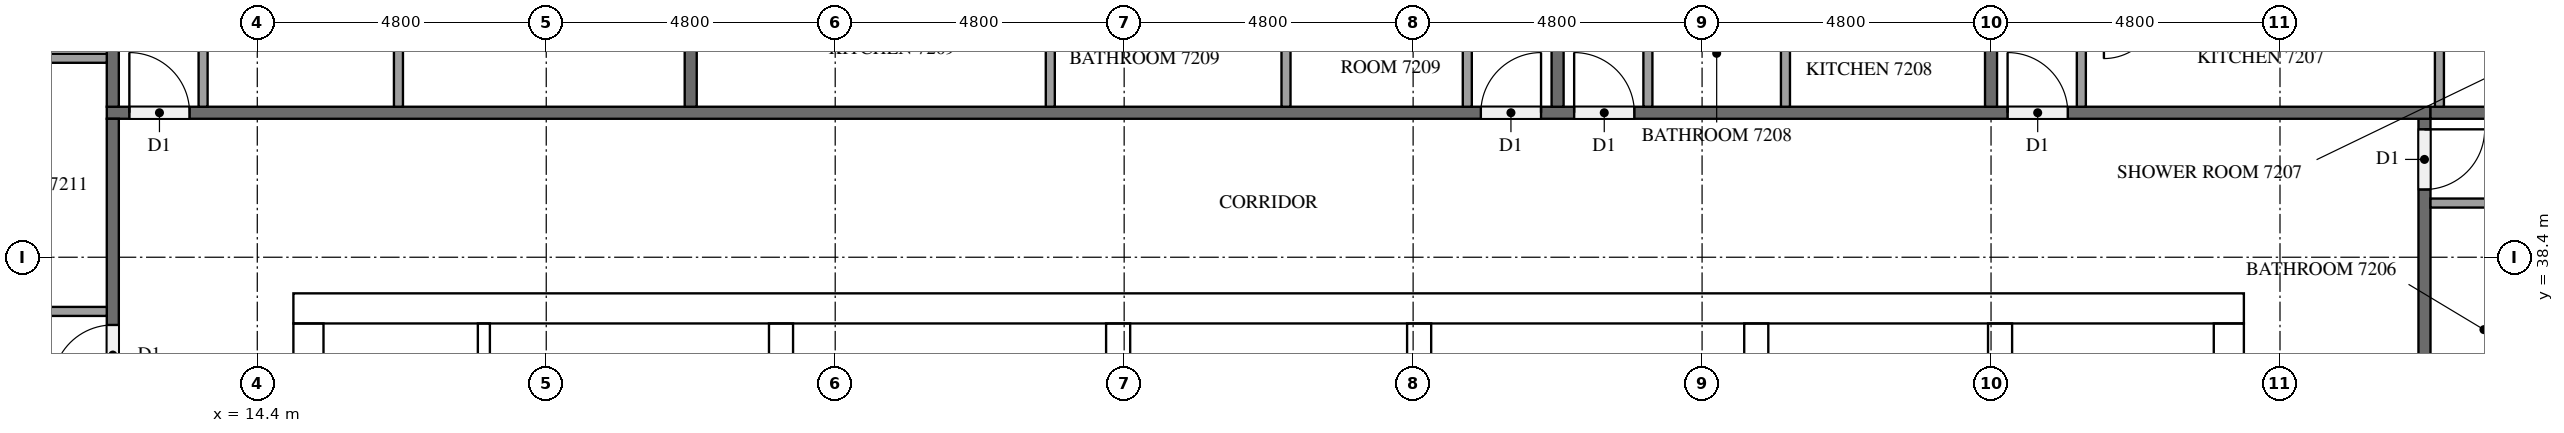
"""IFC4 building model, lengths in metres.
Left out: names, types, materials, properties, quantities, classifications, styles, units other than length and angle.
Written with IfcOpenShell. Run it as: python <this file> out.ifc"""

import sys

from ifc_helpers import new_model, si_unit, direction, frame, frame_2d, origin, place, context, subcontext, project, spatial, rectangle, extrude, element, fill, save


model = new_model("IFC4")
c1 = context("Model", 3, precision=1e-05, world=origin(), true_north=direction((0.0, 1.0)))
c2 = subcontext(c1, "Body", "Model", "MODEL_VIEW")
j1 = project(units=[si_unit("LENGTHUNIT", "METRE"), si_unit("PLANEANGLEUNIT", "RADIAN")], contexts=[c1])
p1 = place(None, origin())
s1 = spatial("IfcSite", under=j1, at=p1, CompositionType="ELEMENT")
p2 = place(p1, origin())
s2 = spatial("IfcBuilding", under=s1, at=p2, CompositionType="ELEMENT")
p3 = place(p2, frame((0.0, 0.0, 275.6)))
s3 = spatial("IfcBuildingStorey", under=s2, at=p3, CompositionType="ELEMENT", Elevation=275.6)
p4 = place(p3, frame((15.0, 37.55, 0.0), z_axis=(0.0, 0.0, 1.0), x_axis=(1.0, 0.0, 0.0)))
e1 = element("IfcWall", 1, at=p4, inside=s3, PredefinedType="SHEAR", context=c2, shape_type="SweptSolid", body=[
    extrude(rectangle(XDim=32.4, YDim=0.5, at=frame_2d((16.2, 0.0))), origin(), (0.0, 0.0, 1.0), 3.2),
])
p5 = place(p4, frame((15.3, 0.0, 0.0)))
e2 = element("IfcOpeningElement", 2, at=p5, cuts=e1, PredefinedType="OPENING", context=c2, shape_type="SweptSolid", body=[
    extrude(rectangle(XDim=1.8, YDim=2.1, at=frame_2d((0.9, 1.05))), frame((0.0, 0.26, 0.0), z_axis=(0.0, -1.0, 0.0), x_axis=(1.0, 0.0, 0.0)), (0.0, 0.0, 1.0), 0.52),
])
p6 = place(p4, frame((1.282, 0.0, 0.0)))
e3 = element("IfcOpeningElement", 3, at=p6, cuts=e1, PredefinedType="OPENING", context=c2, shape_type="SweptSolid", body=[
    extrude(rectangle(XDim=1.0, YDim=2.1, at=frame_2d((0.5, 1.05))), frame((0.0, 0.26, 0.0), z_axis=(0.0, -1.0, 0.0), x_axis=(1.0, 0.0, 0.0)), (0.0, 0.0, 1.0), 0.52),
])
p7 = place(p4, frame((5.082, 0.0, 0.0)))
e4 = element("IfcOpeningElement", 4, at=p7, cuts=e1, PredefinedType="OPENING", context=c2, shape_type="SweptSolid", body=[
    extrude(rectangle(XDim=1.0, YDim=2.1, at=frame_2d((0.5, 1.05))), frame((0.0, 0.26, 0.0), z_axis=(0.0, -1.0, 0.0), x_axis=(1.0, 0.0, 0.0)), (0.0, 0.0, 1.0), 0.52),
])
p8 = place(p3, frame((15.25, 15.5, 0.0), z_axis=(0.0, 0.0, 1.0), x_axis=(0.0, 1.0, 0.0)))
e5 = element("IfcWall", 5, at=p8, inside=s3, PredefinedType="SHEAR", context=c2, shape_type="SweptSolid", body=[
    extrude(rectangle(XDim=21.8, YDim=0.5, at=frame_2d((10.9, 0.0))), origin(), (0.0, 0.0, 1.0), 3.2),
])
p9 = place(p8, frame((5.26, 0.0, 0.0)))
e6 = element("IfcOpeningElement", 6, at=p9, cuts=e5, PredefinedType="OPENING", context=c2, shape_type="SweptSolid", body=[
    extrude(rectangle(XDim=1.2, YDim=2.1, at=frame_2d((0.6, 1.05))), frame((0.0, 0.26, 0.0), z_axis=(0.0, -1.0, 0.0), x_axis=(1.0, 0.0, 0.0)), (0.0, 0.0, 1.0), 0.52),
])
p10 = place(p3, frame((47.15, 15.5, 0.0), z_axis=(0.0, 0.0, 1.0), x_axis=(0.0, 1.0, 0.0)))
e7 = element("IfcWall", 7, at=p10, inside=s3, PredefinedType="SHEAR", context=c2, shape_type="SweptSolid", body=[
    extrude(rectangle(XDim=21.8, YDim=0.5, at=frame_2d((10.9, 0.0))), origin(), (0.0, 0.0, 1.0), 3.2),
])
p11 = place(p10, frame((10.6, 0.0, 0.0)))
e8 = element("IfcOpeningElement", 8, at=p11, cuts=e7, PredefinedType="OPENING", context=c2, shape_type="SweptSolid", body=[
    extrude(rectangle(XDim=1.2, YDim=2.1, at=frame_2d((0.6, 1.05))), frame((0.0, 0.26, 0.0), z_axis=(0.0, -1.0, 0.0), x_axis=(1.0, 0.0, 0.0)), (0.0, 0.0, 1.0), 0.52),
])
p12 = place(p3, frame((23.1, 15.5, 0.0), z_axis=(0.0, 0.0, 1.0), x_axis=(0.0, 1.0, 0.0)))
e9 = element("IfcWall", 9, at=p12, inside=s3, PredefinedType="SHEAR", context=c2, shape_type="SweptSolid", body=[
    extrude(rectangle(XDim=21.8, YDim=0.4, at=frame_2d((10.9, 0.0))), origin(), (0.0, 0.0, 1.0), 3.2),
])
p13 = place(p3, frame((39.3, 27.75, 0.0), z_axis=(0.0, 0.0, 1.0), x_axis=(0.0, 1.0, 0.0)))
e10 = element("IfcWall", 10, at=p13, inside=s3, PredefinedType="SHEAR", context=c2, shape_type="SweptSolid", body=[
    extrude(rectangle(XDim=9.55, YDim=0.4, at=frame_2d((4.775, 0.0))), origin(), (0.0, 0.0, 1.0), 3.2),
])
p14 = place(p3, frame((43.35, 27.75, 0.0), z_axis=(0.0, 0.0, 1.0), x_axis=(0.0, 1.0, 0.0)))
e11 = element("IfcWall", 11, at=p14, inside=s3, PredefinedType="SHEAR", context=c2, shape_type="SweptSolid", body=[
    extrude(rectangle(XDim=9.55, YDim=0.4, at=frame_2d((4.775, 0.0))), origin(), (0.0, 0.0, 1.0), 3.2),
])
p15 = place(p14, frame((7.65, 0.0, 0.0)))
e12 = element("IfcOpeningElement", 12, at=p15, cuts=e11, PredefinedType="OPENING", context=c2, shape_type="SweptSolid", body=[
    extrude(rectangle(XDim=1.2, YDim=2.1, at=frame_2d((0.6, 1.05))), frame((0.0, 0.21, 0.0), z_axis=(0.0, -1.0, 0.0), x_axis=(1.0, 0.0, 0.0)), (0.0, 0.0, 1.0), 0.42),
])
for number, where, z_axis, x_axis in (
    (13, (28.7, 33.75, 0.0), (0.0, 0.0, 1.0), (0.0, 1.0, 0.0)),
    (14, (33.7, 33.75, 0.0), (0.0, 0.0, 1.0), (0.0, 1.0, 0.0)),
):
    element("IfcWall", number, at=place(p3, frame(where, z_axis=z_axis, x_axis=x_axis)), inside=s3, PredefinedType="SHEAR", context=c2, shape_type="SweptSolid", body=[
        extrude(rectangle(XDim=3.55, YDim=0.4, at=frame_2d((1.775, 0.0))), origin(), (0.0, 0.0, 1.0), 3.2),
    ])
p16 = place(p3, frame((18.164, 31.45, 0.0), z_axis=(0.0, 0.0, 1.0), x_axis=(0.0, 1.0, 0.0)))
e15 = element("IfcWall", 15, at=p16, inside=s3, PredefinedType="PARTITIONING", context=c2, shape_type="SweptSolid", body=[
    extrude(rectangle(XDim=5.85, YDim=0.2, at=frame_2d((2.925, 0.0))), origin(), (0.0, 0.0, 1.0), 3.2),
])
p17 = place(p3, frame((50.4, 40.7, 0.0), z_axis=(0.0, 0.0, 1.0), x_axis=(0.0, -1.0, 0.0)))
e16 = element("IfcWall", 16, at=p17, inside=s3, PredefinedType="PARTITIONING", context=c2, shape_type="SweptSolid", body=[
    extrude(rectangle(XDim=28.6, YDim=0.2, at=frame_2d((14.3, 0.0))), origin(), (0.0, 0.0, 1.0), 3.2),
])
p18 = place(p17, frame((27.425, 0.0, 0.0)))
e17 = element("IfcOpeningElement", 17, at=p18, cuts=e16, PredefinedType="OPENING", context=c2, shape_type="SweptSolid", body=[
    extrude(rectangle(XDim=1.0, YDim=2.1, at=frame_2d((0.5, 1.05))), frame((0.0, 0.11, 0.0), z_axis=(0.0, -1.0, 0.0), x_axis=(1.0, 0.0, 0.0)), (0.0, 0.0, 1.0), 0.22),
])
p19 = place(p17, frame((0.175, 0.0, 0.0)))
e18 = element("IfcOpeningElement", 18, at=p19, cuts=e16, PredefinedType="OPENING", context=c2, shape_type="SweptSolid", body=[
    extrude(rectangle(XDim=1.0, YDim=2.1, at=frame_2d((0.5, 1.05))), frame((0.0, 0.11, 0.0), z_axis=(0.0, -1.0, 0.0), x_axis=(1.0, 0.0, 0.0)), (0.0, 0.0, 1.0), 0.22),
])
p20 = place(p3, frame((11.9, 40.8, 0.0), z_axis=(0.0, 0.0, 1.0), x_axis=(1.0, 0.0, 0.0)))
e19 = element("IfcWall", 19, at=p20, inside=s3, PredefinedType="PARTITIONING", context=c2, shape_type="SweptSolid", body=[
    extrude(rectangle(XDim=38.6, YDim=0.2, at=frame_2d((19.3, 0.0))), origin(), (0.0, 0.0, 1.0), 3.2),
])
p21 = place(p20, frame((31.575, 0.0, 0.0)))
e20 = element("IfcOpeningElement", 20, at=p21, cuts=e19, PredefinedType="OPENING", context=c2, shape_type="SweptSolid", body=[
    extrude(rectangle(XDim=1.0, YDim=2.1, at=frame_2d((0.5, 1.05))), frame((0.0, 0.11, 0.0), z_axis=(0.0, -1.0, 0.0), x_axis=(1.0, 0.0, 0.0)), (0.0, 0.0, 1.0), 0.22),
])
p22 = place(p20, frame((24.375, 0.0, 0.0)))
e21 = element("IfcOpeningElement", 21, at=p22, cuts=e19, PredefinedType="OPENING", context=c2, shape_type="SweptSolid", body=[
    extrude(rectangle(XDim=1.0, YDim=2.1, at=frame_2d((0.5, 1.05))), frame((0.0, 0.11, 0.0), z_axis=(0.0, -1.0, 0.0), x_axis=(1.0, 0.0, 0.0)), (0.0, 0.0, 1.0), 0.22),
])
p23 = place(p20, frame((22.825, 0.0, 0.0)))
e22 = element("IfcOpeningElement", 22, at=p23, cuts=e19, PredefinedType="OPENING", context=c2, shape_type="SweptSolid", body=[
    extrude(rectangle(XDim=1.0, YDim=2.1, at=frame_2d((0.5, 1.05))), frame((0.0, 0.11, 0.0), z_axis=(0.0, -1.0, 0.0), x_axis=(1.0, 0.0, 0.0)), (0.0, 0.0, 1.0), 0.22),
])
p24 = place(p20, frame((0.375, 0.0, 0.0)))
e23 = element("IfcOpeningElement", 23, at=p24, cuts=e19, PredefinedType="OPENING", context=c2, shape_type="SweptSolid", body=[
    extrude(rectangle(XDim=1.0, YDim=2.1, at=frame_2d((0.5, 1.05))), frame((0.0, 0.11, 0.0), z_axis=(0.0, -1.0, 0.0), x_axis=(1.0, 0.0, 0.0)), (0.0, 0.0, 1.0), 0.22),
])
p25 = place(p3, frame((12.0, 12.1, 0.0), z_axis=(0.0, 0.0, 1.0), x_axis=(0.0, 1.0, 0.0)))
e24 = element("IfcWall", 24, at=p25, inside=s3, PredefinedType="PARTITIONING", context=c2, shape_type="SweptSolid", body=[
    extrude(rectangle(XDim=28.6, YDim=0.2, at=frame_2d((14.3, 0.0))), origin(), (0.0, 0.0, 1.0), 3.2),
])
p26 = place(p25, frame((24.175, 0.0, 0.0)))
e25 = element("IfcOpeningElement", 25, at=p26, cuts=e24, PredefinedType="OPENING", context=c2, shape_type="SweptSolid", body=[
    extrude(rectangle(XDim=1.0, YDim=2.1, at=frame_2d((0.5, 1.05))), frame((0.0, 0.11, 0.0), z_axis=(0.0, -1.0, 0.0), x_axis=(1.0, 0.0, 0.0)), (0.0, 0.0, 1.0), 0.22),
])
p27 = place(p25, frame((14.575, 0.0, 0.0)))
e26 = element("IfcOpeningElement", 26, at=p27, cuts=e24, PredefinedType="OPENING", context=c2, shape_type="SweptSolid", body=[
    extrude(rectangle(XDim=1.0, YDim=2.1, at=frame_2d((0.5, 1.05))), frame((0.0, 0.11, 0.0), z_axis=(0.0, -1.0, 0.0), x_axis=(1.0, 0.0, 0.0)), (0.0, 0.0, 1.0), 0.22),
])
p28 = place(p25, frame((0.175, 0.0, 0.0)))
e27 = element("IfcOpeningElement", 27, at=p28, cuts=e24, PredefinedType="OPENING", context=c2, shape_type="SweptSolid", body=[
    extrude(rectangle(XDim=1.0, YDim=2.1, at=frame_2d((0.5, 1.05))), frame((0.0, 0.11, 0.0), z_axis=(0.0, -1.0, 0.0), x_axis=(1.0, 0.0, 0.0)), (0.0, 0.0, 1.0), 0.22),
])
p29 = place(p3, frame((50.5, 40.8, 0.0), z_axis=(0.0, 0.0, 1.0), x_axis=(1.0, 0.0, 0.0)))
e28 = element("IfcWall", 28, at=p29, inside=s3, PredefinedType="PARTITIONING", context=c2, shape_type="SweptSolid", body=[
    extrude(rectangle(XDim=7.0, YDim=0.2, at=frame_2d((3.5, 0.0))), origin(), (0.0, 0.0, 1.0), 3.2),
])
p30 = place(p3, frame((43.2, 47.75, 0.0), z_axis=(0.0, 0.0, 1.0), x_axis=(0.0, -1.0, 0.0)))
e29 = element("IfcWall", 29, at=p30, inside=s3, PredefinedType="PARTITIONING", context=c2, shape_type="SweptSolid", body=[
    extrude(rectangle(XDim=6.85, YDim=0.2, at=frame_2d((3.425, 0.0))), origin(), (0.0, 0.0, 1.0), 3.2),
])
for number, where, z_axis, x_axis in (
    (30, (36.0, 47.9, 0.0), (0.0, 0.0, 1.0), (0.0, -1.0, 0.0)),
    (31, (21.6, 47.9, 0.0), (0.0, 0.0, 1.0), (0.0, -1.0, 0.0)),
    (32, (12.0, 47.9, 0.0), (0.0, 0.0, 1.0), (0.0, -1.0, 0.0)),
):
    element("IfcWall", number, at=place(p3, frame(where, z_axis=z_axis, x_axis=x_axis)), inside=s3, PredefinedType="PARTITIONING", context=c2, shape_type="SweptSolid", body=[
        extrude(rectangle(XDim=7.0, YDim=0.2, at=frame_2d((3.5, 0.0))), origin(), (0.0, 0.0, 1.0), 3.2),
    ])
p31 = place(p3, frame((50.5, 39.3, 0.0), z_axis=(0.0, 0.0, 1.0), x_axis=(1.0, 0.0, 0.0)))
e33 = element("IfcWall", 33, at=p31, inside=s3, PredefinedType="PARTITIONING", context=c2, shape_type="SweptSolid", body=[
    extrude(rectangle(XDim=1.925, YDim=0.15, at=frame_2d((0.962, 0.0))), origin(), (0.0, 0.0, 1.0), 3.2),
])
p32 = place(p3, frame((50.648, 40.9, 0.0), z_axis=(0.0, 0.0, 1.0), x_axis=(0.0, 1.0, 0.0)))
e34 = element("IfcWall", 34, at=p32, inside=s3, PredefinedType="PARTITIONING", context=c2, shape_type="SweptSolid", body=[
    extrude(rectangle(XDim=1.625, YDim=0.15, at=frame_2d((0.812, 0.0))), origin(), (0.0, 0.0, 1.0), 3.2),
])
for number, where, z_axis, x_axis in (
    (35, (44.7, 40.9, 0.0), (0.0, 0.0, 1.0), (0.0, 1.0, 0.0)),
    (36, (39.785, 40.9, 0.0), (0.0, 0.0, 1.0), (0.0, 1.0, 0.0)),
):
    element("IfcWall", number, at=place(p3, frame(where, z_axis=z_axis, x_axis=x_axis)), inside=s3, PredefinedType="PARTITIONING", context=c2, shape_type="SweptSolid", body=[
        extrude(rectangle(XDim=1.775, YDim=0.15, at=frame_2d((0.888, 0.0))), origin(), (0.0, 0.0, 1.0), 3.2),
    ])
p33 = place(p3, frame((37.5, 40.9, 0.0), z_axis=(0.0, 0.0, 1.0), x_axis=(0.0, 1.0, 0.0)))
e37 = element("IfcWall", 37, at=p33, inside=s3, PredefinedType="PARTITIONING", context=c2, shape_type="SweptSolid", body=[
    extrude(rectangle(XDim=1.925, YDim=0.15, at=frame_2d((0.962, 0.0))), origin(), (0.0, 0.0, 1.0), 3.2),
])
for number, where, z_axis, x_axis in (
    (38, (31.489, 40.9, 0.0), (0.0, 0.0, 1.0), (0.0, 1.0, 0.0)),
    (39, (27.573, 40.9, 0.0), (0.0, 0.0, 1.0), (0.0, 1.0, 0.0)),
):
    element("IfcWall", number, at=place(p3, frame(where, z_axis=z_axis, x_axis=x_axis)), inside=s3, PredefinedType="PARTITIONING", context=c2, shape_type="SweptSolid", body=[
        extrude(rectangle(XDim=2.075, YDim=0.15, at=frame_2d((1.038, 0.0))), origin(), (0.0, 0.0, 1.0), 3.2),
    ])
p34 = place(p3, frame((34.5, 40.9, 0.0), z_axis=(0.0, 0.0, 1.0), x_axis=(0.0, 1.0, 0.0)))
e40 = element("IfcWall", 40, at=p34, inside=s3, PredefinedType="PARTITIONING", context=c2, shape_type="SweptSolid", body=[
    extrude(rectangle(XDim=2.225, YDim=0.15, at=frame_2d((1.113, 0.0))), origin(), (0.0, 0.0, 1.0), 3.2),
])
p35 = place(p3, frame((16.745, 40.9, 0.0), z_axis=(0.0, 0.0, 1.0), x_axis=(0.0, 1.0, 0.0)))
e41 = element("IfcWall", 41, at=p35, inside=s3, PredefinedType="PARTITIONING", context=c2, shape_type="SweptSolid", body=[
    extrude(rectangle(XDim=2.075, YDim=0.15, at=frame_2d((1.038, 0.0))), origin(), (0.0, 0.0, 1.0), 3.2),
])
p36 = place(p3, frame((13.5, 40.9, 0.0), z_axis=(0.0, 0.0, 1.0), x_axis=(0.0, 1.0, 0.0)))
e42 = element("IfcWall", 42, at=p36, inside=s3, PredefinedType="PARTITIONING", context=c2, shape_type="SweptSolid", body=[
    extrude(rectangle(XDim=2.225, YDim=0.15, at=frame_2d((1.113, 0.0))), origin(), (0.0, 0.0, 1.0), 3.2),
])
p37 = place(p3, frame((11.9, 41.705, 0.0), z_axis=(0.0, 0.0, 1.0), x_axis=(-1.0, 0.0, 0.0)))
e43 = element("IfcWall", 43, at=p37, inside=s3, PredefinedType="PARTITIONING", context=c2, shape_type="SweptSolid", body=[
    extrude(rectangle(XDim=3.125, YDim=0.15, at=frame_2d((1.562, 0.0))), origin(), (0.0, 0.0, 1.0), 3.2),
])
p38 = place(p3, frame((11.9, 37.5, 0.0), z_axis=(0.0, 0.0, 1.0), x_axis=(-1.0, 0.0, 0.0)))
e44 = element("IfcWall", 44, at=p38, inside=s3, PredefinedType="PARTITIONING", context=c2, shape_type="SweptSolid", body=[
    extrude(rectangle(XDim=3.275, YDim=0.15, at=frame_2d((1.637, 0.0))), origin(), (0.0, 0.0, 1.0), 3.2),
])
p39 = place(p5, origin())
e45 = element("IfcDoor", 45, at=p39, inside=s3, OperationType="DOUBLE_DOOR_SINGLE_SWING", PredefinedType="DOOR", context=c2, shape_type="SweptSolid", body=[
    extrude(rectangle(XDim=1.8, YDim=2.1, at=frame_2d((0.9, 1.05))), frame((0.0, 0.025, 0.0), z_axis=(0.0, -1.0, 0.0), x_axis=(1.0, 0.0, 0.0)), (0.0, 0.0, 1.0), 0.05),
])
fill(e2, e45)
p40 = place(p6, origin())
e46 = element("IfcDoor", 46, at=p40, inside=s3, OperationType="SINGLE_SWING_LEFT", PredefinedType="DOOR", context=c2, shape_type="SweptSolid", body=[
    extrude(rectangle(XDim=1.0, YDim=2.1, at=frame_2d((0.5, 1.05))), frame((0.0, 0.025, 0.0), z_axis=(0.0, -1.0, 0.0), x_axis=(1.0, 0.0, 0.0)), (0.0, 0.0, 1.0), 0.05),
])
fill(e3, e46)
p41 = place(p7, origin())
e47 = element("IfcDoor", 47, at=p41, inside=s3, OperationType="SINGLE_SWING_RIGHT", PredefinedType="DOOR", context=c2, shape_type="SweptSolid", body=[
    extrude(rectangle(XDim=1.0, YDim=2.1, at=frame_2d((0.5, 1.05))), frame((0.0, 0.025, 0.0), z_axis=(0.0, -1.0, 0.0), x_axis=(1.0, 0.0, 0.0)), (0.0, 0.0, 1.0), 0.05),
])
fill(e4, e47)
p42 = place(p19, origin())
e48 = element("IfcDoor", 48, at=p42, inside=s3, OperationType="SINGLE_SWING_LEFT", PredefinedType="DOOR", context=c2, shape_type="SweptSolid", body=[
    extrude(rectangle(XDim=1.0, YDim=2.1, at=frame_2d((0.5, 1.05))), frame((0.0, 0.025, 0.0), z_axis=(0.0, -1.0, 0.0), x_axis=(1.0, 0.0, 0.0)), (0.0, 0.0, 1.0), 0.05),
])
fill(e18, e48)
p43 = place(p21, origin())
e49 = element("IfcDoor", 49, at=p43, inside=s3, OperationType="SINGLE_SWING_LEFT", PredefinedType="DOOR", context=c2, shape_type="SweptSolid", body=[
    extrude(rectangle(XDim=1.0, YDim=2.1, at=frame_2d((0.5, 1.05))), frame((0.0, 0.025, 0.0), z_axis=(0.0, -1.0, 0.0), x_axis=(1.0, 0.0, 0.0)), (0.0, 0.0, 1.0), 0.05),
])
fill(e20, e49)
p44 = place(p22, origin())
e50 = element("IfcDoor", 50, at=p44, inside=s3, OperationType="SINGLE_SWING_LEFT", PredefinedType="DOOR", context=c2, shape_type="SweptSolid", body=[
    extrude(rectangle(XDim=1.0, YDim=2.1, at=frame_2d((0.5, 1.05))), frame((0.0, 0.025, 0.0), z_axis=(0.0, -1.0, 0.0), x_axis=(1.0, 0.0, 0.0)), (0.0, 0.0, 1.0), 0.05),
])
fill(e21, e50)
p45 = place(p23, origin())
e51 = element("IfcDoor", 51, at=p45, inside=s3, OperationType="SINGLE_SWING_RIGHT", PredefinedType="DOOR", context=c2, shape_type="SweptSolid", body=[
    extrude(rectangle(XDim=1.0, YDim=2.1, at=frame_2d((0.5, 1.05))), frame((0.0, 0.025, 0.0), z_axis=(0.0, -1.0, 0.0), x_axis=(1.0, 0.0, 0.0)), (0.0, 0.0, 1.0), 0.05),
])
fill(e22, e51)
p46 = place(p24, origin())
e52 = element("IfcDoor", 52, at=p46, inside=s3, OperationType="SINGLE_SWING_LEFT", PredefinedType="DOOR", context=c2, shape_type="SweptSolid", body=[
    extrude(rectangle(XDim=1.0, YDim=2.1, at=frame_2d((0.5, 1.05))), frame((0.0, 0.025, 0.0), z_axis=(0.0, -1.0, 0.0), x_axis=(1.0, 0.0, 0.0)), (0.0, 0.0, 1.0), 0.05),
])
fill(e23, e52)
p47 = place(p26, origin())
e53 = element("IfcDoor", 53, at=p47, inside=s3, OperationType="SINGLE_SWING_LEFT", PredefinedType="DOOR", context=c2, shape_type="SweptSolid", body=[
    extrude(rectangle(XDim=1.0, YDim=2.1, at=frame_2d((0.5, 1.05))), frame((0.0, 0.025, 0.0), z_axis=(0.0, -1.0, 0.0), x_axis=(1.0, 0.0, 0.0)), (0.0, 0.0, 1.0), 0.05),
])
fill(e25, e53)
save(model, sys.argv[1])
